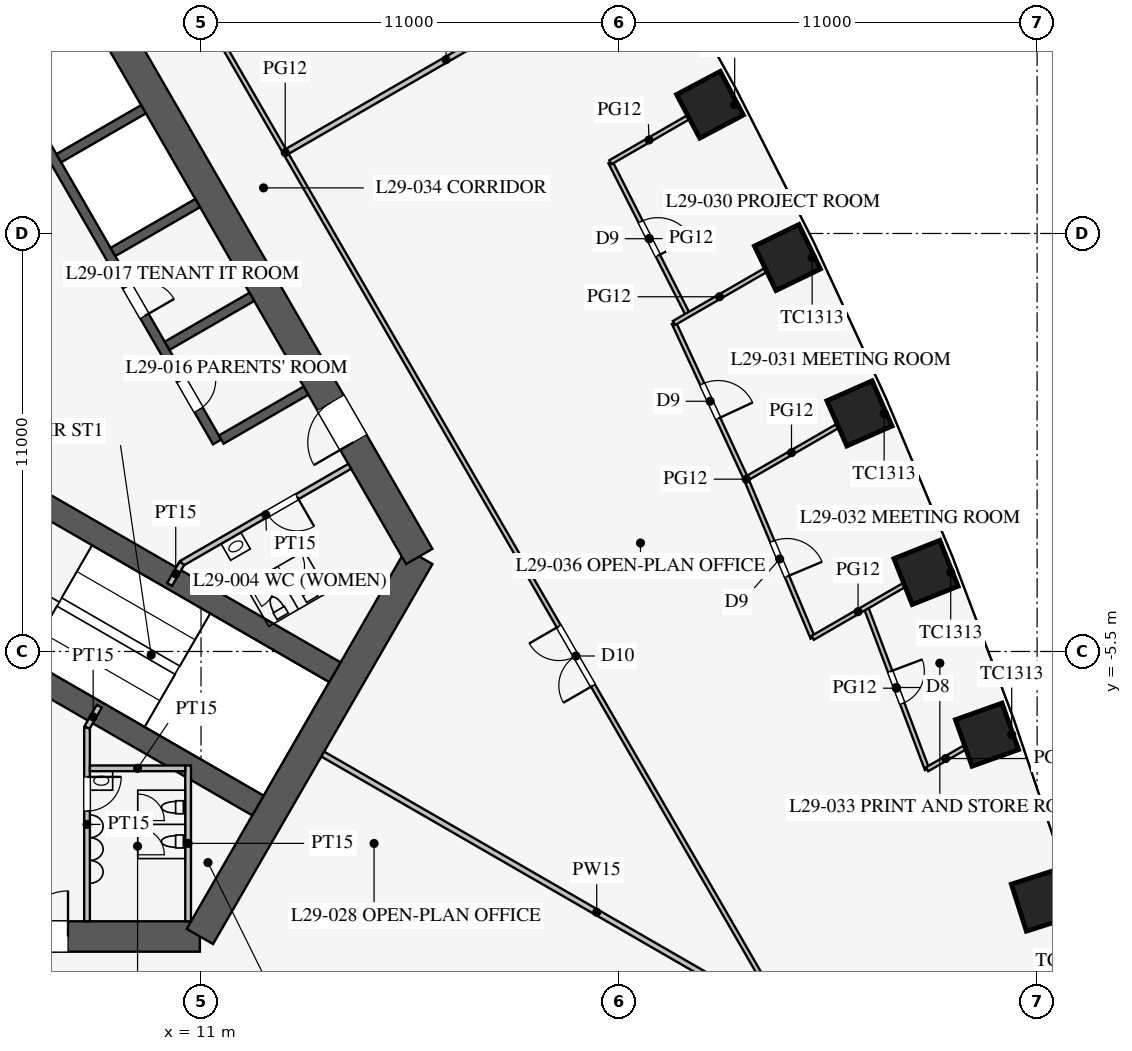
"""IFC4 building model, lengths in metres.
Left out: names, types, materials, properties, quantities, classifications, styles, units other than length and angle.
Written with IfcOpenShell. Run it as: python <this file> out.ifc"""

import sys

from ifc_helpers import new_model, si_unit, direction, frame, frame_2d, origin, origin_2d, place, context, subcontext, project, spatial, rectangle, extrude, element, fill, save


model = new_model("IFC4")
c1 = context("Model", 3, precision=1e-05, world=origin(), true_north=direction((0.0, 1.0)))
c2 = subcontext(c1, "Body", "Model", "MODEL_VIEW")
j1 = project(units=[si_unit("LENGTHUNIT", "METRE"), si_unit("PLANEANGLEUNIT", "RADIAN")], contexts=[c1])
p1 = place(None, origin())
s1 = spatial("IfcSite", under=j1, at=p1, CompositionType="ELEMENT")
p2 = place(p1, origin())
s2 = spatial("IfcBuilding", under=s1, at=p2, CompositionType="ELEMENT")
p3 = place(p2, frame((0.0, 0.0, 128.3)))
s3 = spatial("IfcBuildingStorey", under=s2, at=p3, CompositionType="ELEMENT", Elevation=128.3)
for number, where, z_axis, x_axis in (
    (1, (33.139, -12.044, 0.0), (0.0, 0.0, 1.0), (-0.305, 0.952, 0.0)),
    (2, (31.682, -7.689, 0.0), (0.0, 0.0, 1.0), (-0.336, 0.942, 0.0)),
    (3, (30.077, -3.42, 0.0), (0.0, 0.0, 1.0), (-0.37, 0.929, 0.0)),
    (4, (28.325, 0.765, 0.0), (0.0, 0.0, 1.0), (-0.403, 0.915, 0.0)),
    (5, (26.43, 4.867, 0.0), (0.0, 0.0, 1.0), (-0.436, 0.9, 0.0)),
    (6, (24.393, 8.887, 0.0), (0.0, 0.0, 1.0), (-0.468, 0.883, 0.0)),
):
    element("IfcColumn", number, at=place(p3, frame(where, z_axis=z_axis, x_axis=x_axis)), inside=s3, PredefinedType="COLUMN", context=c2, shape_type="SweptSolid", body=[
        extrude(rectangle(XDim=1.3, YDim=1.3, at=origin_2d()), origin(), (0.0, 0.0, 1.0), 4.2),
    ])
p4 = place(p3, frame((-10.97, -13.0, 0.0), z_axis=(0.0, 0.0, 1.0), x_axis=(1.0, 0.0, 0.0)))
e7 = element("IfcWall", 7, at=p4, inside=s3, PredefinedType="SHEAR", context=c2, shape_type="SweptSolid", body=[
    extrude(rectangle(XDim=21.939, YDim=0.8, at=frame_2d((10.97, 0.0))), origin(), (0.0, 0.0, 1.0), 4.2),
])
p5 = place(p4, frame((17.27, 0.0, 0.0)))
e8 = element("IfcOpeningElement", 8, at=p5, cuts=e7, PredefinedType="OPENING", context=c2, shape_type="SweptSolid", body=[
    extrude(rectangle(XDim=1.2, YDim=2.1, at=frame_2d((0.6, 1.05))), frame((0.0, 0.41, 0.0), z_axis=(0.0, -1.0, 0.0), x_axis=(1.0, 0.0, 0.0)), (0.0, 0.0, 1.0), 0.82),
])
p6 = place(p4, frame((3.47, 0.0, 0.0)))
e9 = element("IfcOpeningElement", 9, at=p6, cuts=e7, PredefinedType="OPENING", context=c2, shape_type="SweptSolid", body=[
    extrude(rectangle(XDim=1.2, YDim=2.1, at=frame_2d((0.6, 1.05))), frame((0.0, 0.41, 0.0), z_axis=(0.0, -1.0, 0.0), x_axis=(1.0, 0.0, 0.0)), (0.0, 0.0, 1.0), 0.82),
])
p7 = place(p3, frame((10.97, -13.0, 0.0), z_axis=(0.0, 0.0, 1.0), x_axis=(0.499995765644, 0.866027848477, 0.0)))
e10 = element("IfcWall", 10, at=p7, inside=s3, PredefinedType="SHEAR", context=c2, shape_type="SweptSolid", body=[
    extrude(rectangle(XDim=11.547, YDim=0.8, at=frame_2d((5.773, 0.0))), origin(), (0.0, 0.0, 1.0), 4.2),
])
p8 = place(p3, frame((16.743, -3.0, 0.0), z_axis=(0.0, 0.0, 1.0), x_axis=(-0.500002442456, 0.866023993627, 0.0)))
e11 = element("IfcWall", 11, at=p8, inside=s3, PredefinedType="SHEAR", context=c2, shape_type="SweptSolid", body=[
    extrude(rectangle(XDim=21.939, YDim=0.8, at=frame_2d((10.97, 0.0))), origin(), (0.0, 0.0, 1.0), 4.2),
])
p9 = place(p8, frame((17.27, 0.0, 0.0)))
e12 = element("IfcOpeningElement", 12, at=p9, cuts=e11, PredefinedType="OPENING", context=c2, shape_type="SweptSolid", body=[
    extrude(rectangle(XDim=1.2, YDim=2.1, at=frame_2d((0.6, 1.05))), frame((0.0, 0.41, 0.0), z_axis=(0.0, -1.0, 0.0), x_axis=(1.0, 0.0, 0.0)), (0.0, 0.0, 1.0), 0.82),
])
p10 = place(p8, frame((3.47, 0.0, 0.0)))
e13 = element("IfcOpeningElement", 13, at=p10, cuts=e11, PredefinedType="OPENING", context=c2, shape_type="SweptSolid", body=[
    extrude(rectangle(XDim=1.2, YDim=2.1, at=frame_2d((0.6, 1.05))), frame((0.0, 0.41, 0.0), z_axis=(0.0, -1.0, 0.0), x_axis=(1.0, 0.0, 0.0)), (0.0, 0.0, 1.0), 0.82),
])
p11 = place(p3, frame((11.424, 0.014, 0.0), z_axis=(0.0, 0.0, 1.0), x_axis=(-0.500001763848, 0.866024385424, 0.0)))
e14 = element("IfcWall", 14, at=p11, inside=s3, PredefinedType="SHEAR", context=c2, shape_type="SweptSolid", body=[
    extrude(rectangle(XDim=11.4, YDim=0.25, at=frame_2d((5.7, 0.0))), origin(), (0.0, 0.0, 1.0), 4.2),
])
p12 = place(p11, frame((0.975, 0.0, 0.0)))
e15 = element("IfcOpeningElement", 15, at=p12, cuts=e14, PredefinedType="OPENING", context=c2, shape_type="SweptSolid", body=[
    extrude(rectangle(XDim=0.9, YDim=2.1, at=frame_2d((0.45, 1.05))), frame((0.0, 0.135, 0.0), z_axis=(0.0, -1.0, 0.0), x_axis=(1.0, 0.0, 0.0)), (0.0, 0.0, 1.0), 0.27),
])
p13 = place(p11, frame((3.825, 0.0, 0.0)))
e16 = element("IfcOpeningElement", 16, at=p13, cuts=e14, PredefinedType="OPENING", context=c2, shape_type="SweptSolid", body=[
    extrude(rectangle(XDim=0.9, YDim=2.1, at=frame_2d((0.45, 1.05))), frame((0.0, 0.135, 0.0), z_axis=(0.0, -1.0, 0.0), x_axis=(1.0, 0.0, 0.0)), (0.0, 0.0, 1.0), 0.27),
])
for number, where, z_axis, x_axis in (
    (17, (11.532, 0.076, 0.0), (0.0, 0.0, 1.0), (0.866, 0.5, 0.0)),
    (18, (10.107, 2.544, 0.0), (0.0, 0.0, 1.0), (0.866, 0.5, 0.0)),
    (19, (8.682, 5.012, 0.0), (0.0, 0.0, 1.0), (0.866, 0.5, 0.0)),
    (20, (7.257, 7.481, 0.0), (0.0, 0.0, 1.0), (0.866, 0.5, 0.0)),
):
    element("IfcWall", number, at=place(p3, frame(where, z_axis=z_axis, x_axis=x_axis)), inside=s3, PredefinedType="SHEAR", context=c2, shape_type="SweptSolid", body=[
        extrude(rectangle(XDim=2.575, YDim=0.25, at=frame_2d((1.288, 0.0))), origin(), (0.0, 0.0, 1.0), 4.2),
    ])
p14 = place(p3, frame((5.832, 9.949, 0.0), z_axis=(0.0, 0.0, 1.0), x_axis=(0.866029291668, 0.499993265928, 0.0)))
e21 = element("IfcWall", 21, at=p14, inside=s3, PredefinedType="SHEAR", context=c2, shape_type="SweptSolid", body=[
    extrude(rectangle(XDim=2.575, YDim=0.25, at=frame_2d((1.288, 0.0))), origin(), (0.0, 0.0, 1.0), 4.2),
])
for number, where, z_axis, x_axis in (
    (22, (4.638, -5.016, 0.0), (0.0, 0.0, 1.0), (0.866, -0.5, 0.0)),
    (23, (6.663, -1.509, 0.0), (0.0, 0.0, 1.0), (0.866, -0.5, 0.0)),
):
    element("IfcWall", number, at=place(p3, frame(where, z_axis=z_axis, x_axis=x_axis)), inside=s3, PredefinedType="SHEAR", context=c2, shape_type="SweptSolid", body=[
        extrude(rectangle(XDim=9.075, YDim=0.6, at=frame_2d((4.538, 0.0))), origin(), (0.0, 0.0, 1.0), 4.2),
    ])
p15 = place(p3, frame((8.0, -7.5, 0.0), z_axis=(0.0, 0.0, 1.0), x_axis=(0.0, -1.0, 0.0)))
e24 = element("IfcWall", 24, at=p15, inside=s3, PredefinedType="PARTITIONING", context=c2, shape_type="SweptSolid", body=[
    extrude(rectangle(XDim=5.1, YDim=0.15, at=frame_2d((2.55, 0.0))), origin(), (0.0, 0.0, 1.0), 4.0),
])
p16 = place(p15, frame((1.3, 0.0, 0.0)))
e25 = element("IfcOpeningElement", 25, at=p16, cuts=e24, PredefinedType="OPENING", context=c2, shape_type="SweptSolid", body=[
    extrude(rectangle(XDim=0.9, YDim=2.1, at=frame_2d((0.45, 1.05))), frame((0.0, 0.085, 0.0), z_axis=(0.0, -1.0, 0.0), x_axis=(1.0, 0.0, 0.0)), (0.0, 0.0, 1.0), 0.17),
])
p17 = place(p3, frame((10.495, -3.178, 0.0), z_axis=(0.0, 0.0, 1.0), x_axis=(0.86602216432, 0.500005610874, 0.0)))
e26 = element("IfcWall", 26, at=p17, inside=s3, PredefinedType="PARTITIONING", context=c2, shape_type="SweptSolid", body=[
    extrude(rectangle(XDim=5.1, YDim=0.15, at=frame_2d((2.55, 0.0))), origin(), (0.0, 0.0, 1.0), 4.0),
])
p18 = place(p17, frame((2.6, 0.0, 0.0)))
e27 = element("IfcOpeningElement", 27, at=p18, cuts=e26, PredefinedType="OPENING", context=c2, shape_type="SweptSolid", body=[
    extrude(rectangle(XDim=0.9, YDim=2.1, at=frame_2d((0.45, 1.05))), frame((0.0, 0.085, 0.0), z_axis=(0.0, -1.0, 0.0), x_axis=(1.0, 0.0, 0.0)), (0.0, 0.0, 1.0), 0.17),
])
for number, where, z_axis, x_axis in (
    (28, (8.0, -7.5, 0.0), (0.0, 0.0, 1.0), (0.5, 0.866, 0.0)),
    (29, (10.495, -3.178, 0.0), (0.0, 0.0, 1.0), (-0.5, -0.866, 0.0)),
):
    element("IfcWall", number, at=place(p3, frame(where, z_axis=z_axis, x_axis=x_axis)), inside=s3, PredefinedType="PARTITIONING", context=c2, shape_type="SweptSolid", body=[
        extrude(rectangle(XDim=0.645, YDim=0.15, at=frame_2d((0.323, 0.0))), origin(), (0.0, 0.0, 1.0), 4.0),
    ])
p19 = place(p3, frame((10.66, -8.5, 0.0), z_axis=(0.0, 0.0, 1.0), x_axis=(0.0, -1.0, 0.0)))
e30 = element("IfcWall", 30, at=p19, inside=s3, PredefinedType="PARTITIONING", context=c2, shape_type="SweptSolid", body=[
    extrude(rectangle(XDim=4.1, YDim=0.15, at=frame_2d((2.05, 0.0))), origin(), (0.0, 0.0, 1.0), 4.0),
])
p20 = place(p3, frame((8.075, -8.575, 0.0), z_axis=(0.0, 0.0, 1.0), x_axis=(1.0, 0.0, 0.0)))
e31 = element("IfcWall", 31, at=p20, inside=s3, PredefinedType="PARTITIONING", context=c2, shape_type="SweptSolid", body=[
    extrude(rectangle(XDim=2.51, YDim=0.15, at=frame_2d((1.255, 0.0))), origin(), (0.0, 0.0, 1.0), 4.0),
])
p21 = place(p3, frame((14.203, -8.2, 0.0), z_axis=(0.0, 0.0, 1.0), x_axis=(0.866024668836, -0.500001272966, 0.0)))
e32 = element("IfcWall", 32, at=p21, inside=s3, PredefinedType="PARTITIONING", context=c2, shape_type="SweptSolid", body=[
    extrude(rectangle(XDim=16.65, YDim=0.15, at=frame_2d((8.325, 0.0))), origin(), (0.0, 0.0, 1.0), 2.3),
])
p22 = place(p3, frame((13.268, 7.66, 0.0), z_axis=(0.0, 0.0, 1.0), x_axis=(0.866015788683, 0.500016653474, 0.0)))
e33 = element("IfcWall", 33, at=p22, inside=s3, PredefinedType="PARTITIONING", context=c2, shape_type="SweptSolid", body=[
    extrude(rectangle(XDim=9.65, YDim=0.15, at=frame_2d((4.825, 0.0))), origin(), (0.0, 0.0, 1.0), 3.2),
])
p23 = place(p3, frame((26.415, -15.231, 0.0), z_axis=(0.0, 0.0, 1.0), x_axis=(-0.50000091641, 0.866024874695, 0.0)))
e34 = element("IfcWall", 34, at=p23, inside=s3, PredefinedType="PARTITIONING", context=c2, shape_type="SweptSolid", body=[
    extrude(rectangle(XDim=52.796, YDim=0.12, at=frame_2d((26.398, 0.0))), origin(), (0.0, 0.0, 1.0), 2.9),
])
p24 = place(p23, frame((10.2, 0.0, 0.15)))
e35 = element("IfcOpeningElement", 35, at=p24, cuts=e34, PredefinedType="OPENING", context=c2, shape_type="SweptSolid", body=[
    extrude(rectangle(XDim=1.8, YDim=2.1, at=frame_2d((0.9, 1.05))), frame((0.0, 0.07, 0.0), z_axis=(0.0, -1.0, 0.0), x_axis=(1.0, 0.0, 0.0)), (0.0, 0.0, 1.0), 0.14),
])
p25 = place(p23, frame((40.8, 0.0, 0.15)))
e36 = element("IfcOpeningElement", 36, at=p25, cuts=e34, PredefinedType="OPENING", context=c2, shape_type="SweptSolid", body=[
    extrude(rectangle(XDim=1.8, YDim=2.1, at=frame_2d((0.9, 1.05))), frame((0.0, 0.07, 0.0), z_axis=(0.0, -1.0, 0.0), x_axis=(1.0, 0.0, 0.0)), (0.0, 0.0, 1.0), 0.14),
])
p26 = place(p3, frame((25.342, -0.958, 0.0), z_axis=(0.0, 0.0, 1.0), x_axis=(-0.419883773418, 0.907577884713, 0.0)))
e37 = element("IfcWall", 37, at=p26, inside=s3, PredefinedType="PARTITIONING", context=c2, shape_type="SweptSolid", body=[
    extrude(rectangle(XDim=4.519, YDim=0.12, at=frame_2d((2.259, 0.0))), origin(), (0.0, 0.0, 1.0), 2.9),
])
p27 = place(p26, frame((1.75, 0.0, 0.15)))
e38 = element("IfcOpeningElement", 38, at=p27, cuts=e37, PredefinedType="OPENING", context=c2, shape_type="SweptSolid", body=[
    extrude(rectangle(XDim=1.0, YDim=2.1, at=frame_2d((0.5, 1.05))), frame((0.0, 0.07, 0.0), z_axis=(0.0, -1.0, 0.0), x_axis=(1.0, 0.0, 0.0)), (0.0, 0.0, 1.0), 0.14),
])
p28 = place(p3, frame((27.096, -5.141, 0.0), z_axis=(0.0, 0.0, 1.0), x_axis=(-0.386807881778, 0.922160323693, 0.0)))
e39 = element("IfcWall", 39, at=p28, inside=s3, PredefinedType="PARTITIONING", context=c2, shape_type="SweptSolid", body=[
    extrude(rectangle(XDim=4.536, YDim=0.12, at=frame_2d((2.268, 0.0))), origin(), (0.0, 0.0, 1.0), 2.9),
])
p29 = place(p28, frame((1.75, 0.0, 0.15)))
e40 = element("IfcOpeningElement", 40, at=p29, cuts=e39, PredefinedType="OPENING", context=c2, shape_type="SweptSolid", body=[
    extrude(rectangle(XDim=1.0, YDim=2.1, at=frame_2d((0.5, 1.05))), frame((0.0, 0.07, 0.0), z_axis=(0.0, -1.0, 0.0), x_axis=(1.0, 0.0, 0.0)), (0.0, 0.0, 1.0), 0.14),
])
p30 = place(p3, frame((30.104, -8.6, 0.0), z_axis=(0.0, 0.0, 1.0), x_axis=(-0.35295910498, 0.935638749845, 0.0)))
e41 = element("IfcWall", 41, at=p30, inside=s3, PredefinedType="PARTITIONING", context=c2, shape_type="SweptSolid", body=[
    extrude(rectangle(XDim=4.56, YDim=0.12, at=frame_2d((2.28, 0.0))), origin(), (0.0, 0.0, 1.0), 2.9),
])
p31 = place(p30, frame((1.85, 0.0, 0.15)))
e42 = element("IfcOpeningElement", 42, at=p31, cuts=e41, PredefinedType="OPENING", context=c2, shape_type="SweptSolid", body=[
    extrude(rectangle(XDim=0.9, YDim=2.1, at=frame_2d((0.45, 1.05))), frame((0.0, 0.07, 0.0), z_axis=(0.0, -1.0, 0.0), x_axis=(1.0, 0.0, 0.0)), (0.0, 0.0, 1.0), 0.14),
])
p32 = place(p3, frame((23.812, 3.356, 0.0), z_axis=(0.0, 0.0, 1.0), x_axis=(-0.452449820092, 0.891789863308, 0.0)))
e43 = element("IfcWall", 43, at=p32, inside=s3, PredefinedType="PARTITIONING", context=c2, shape_type="SweptSolid", body=[
    extrude(rectangle(XDim=4.507, YDim=0.12, at=frame_2d((2.253, 0.0))), origin(), (0.0, 0.0, 1.0), 2.9),
])
p33 = place(p32, frame((1.75, 0.0, 0.15)))
e44 = element("IfcOpeningElement", 44, at=p33, cuts=e43, PredefinedType="OPENING", context=c2, shape_type="SweptSolid", body=[
    extrude(rectangle(XDim=1.0, YDim=2.1, at=frame_2d((0.5, 1.05))), frame((0.0, 0.07, 0.0), z_axis=(0.0, -1.0, 0.0), x_axis=(1.0, 0.0, 0.0)), (0.0, 0.0, 1.0), 0.14),
])
p34 = place(p3, frame((25.342, -0.958, 0.0), z_axis=(0.0, 0.0, 1.0), x_axis=(0.866014808974, 0.500018350302, 0.0)))
e45 = element("IfcWall", 45, at=p34, inside=s3, PredefinedType="PARTITIONING", context=c2, shape_type="SweptSolid", body=[
    extrude(rectangle(XDim=2.762, YDim=0.12, at=frame_2d((1.381, 0.0))), origin(), (0.0, 0.0, 1.0), 2.9),
])
p35 = place(p3, frame((27.096, -5.141, 0.0), z_axis=(0.0, 0.0, 1.0), x_axis=(0.866014354455, 0.500019137511, 0.0)))
e46 = element("IfcWall", 46, at=p35, inside=s3, PredefinedType="PARTITIONING", context=c2, shape_type="SweptSolid", body=[
    extrude(rectangle(XDim=2.754, YDim=0.12, at=frame_2d((1.377, 0.0))), origin(), (0.0, 0.0, 1.0), 2.9),
])
p36 = place(p3, frame((30.104, -8.6, 0.0), z_axis=(0.0, 0.0, 1.0), x_axis=(0.866041729639, 0.499971721724, 0.0)))
e47 = element("IfcWall", 47, at=p36, inside=s3, PredefinedType="PARTITIONING", context=c2, shape_type="SweptSolid", body=[
    extrude(rectangle(XDim=1.13, YDim=0.12, at=frame_2d((0.565, 0.0))), origin(), (0.0, 0.0, 1.0), 2.9),
])
p37 = place(p3, frame((21.773, 7.375, 0.0), z_axis=(0.0, 0.0, 1.0), x_axis=(0.866055506462, 0.499947857008, 0.0)))
e48 = element("IfcWall", 48, at=p37, inside=s3, PredefinedType="PARTITIONING", context=c2, shape_type="SweptSolid", body=[
    extrude(rectangle(XDim=2.344, YDim=0.12, at=frame_2d((1.172, 0.0))), origin(), (0.0, 0.0, 1.0), 2.9),
])
p38 = place(p3, frame((23.444, 3.143, 0.0), z_axis=(0.0, 0.0, 1.0), x_axis=(0.866023907196, 0.500002592159, 0.0)))
e49 = element("IfcWall", 49, at=p38, inside=s3, PredefinedType="PARTITIONING", context=c2, shape_type="SweptSolid", body=[
    extrude(rectangle(XDim=2.766, YDim=0.12, at=frame_2d((1.383, 0.0))), origin(), (0.0, 0.0, 1.0), 2.9),
])
p39 = place(p16, origin())
e50 = element("IfcDoor", 50, at=p39, inside=s3, OperationType="SINGLE_SWING_LEFT", PredefinedType="DOOR", context=c2, shape_type="SweptSolid", body=[
    extrude(rectangle(XDim=0.9, YDim=2.1, at=frame_2d((0.45, 1.05))), frame((0.0, 0.025, 0.0), z_axis=(0.0, -1.0, 0.0), x_axis=(1.0, 0.0, 0.0)), (0.0, 0.0, 1.0), 0.05),
])
fill(e25, e50)
p40 = place(p18, frame((0.9, 0.0, 0.0), z_axis=(0.0, 0.0, 1.0), x_axis=(-1.0, 0.0, 0.0)))
e51 = element("IfcDoor", 51, at=p40, inside=s3, OperationType="SINGLE_SWING_LEFT", PredefinedType="DOOR", context=c2, shape_type="SweptSolid", body=[
    extrude(rectangle(XDim=0.9, YDim=2.1, at=frame_2d((0.45, 1.05))), frame((0.0, 0.025, 0.0), z_axis=(0.0, -1.0, 0.0), x_axis=(1.0, 0.0, 0.0)), (0.0, 0.0, 1.0), 0.05),
])
fill(e27, e51)
p41 = place(p5, origin())
e52 = element("IfcDoor", 52, at=p41, inside=s3, OperationType="SINGLE_SWING_RIGHT", PredefinedType="DOOR", context=c2, shape_type="SweptSolid", body=[
    extrude(rectangle(XDim=1.2, YDim=2.1, at=frame_2d((0.6, 1.05))), frame((0.0, 0.025, 0.0), z_axis=(0.0, -1.0, 0.0), x_axis=(1.0, 0.0, 0.0)), (0.0, 0.0, 1.0), 0.05),
])
fill(e8, e52)
p42 = place(p10, origin())
e53 = element("IfcDoor", 53, at=p42, inside=s3, OperationType="SINGLE_SWING_LEFT", PredefinedType="DOOR", context=c2, shape_type="SweptSolid", body=[
    extrude(rectangle(XDim=1.2, YDim=2.1, at=frame_2d((0.6, 1.05))), frame((0.0, 0.025, 0.0), z_axis=(0.0, -1.0, 0.0), x_axis=(1.0, 0.0, 0.0)), (0.0, 0.0, 1.0), 0.05),
])
fill(e13, e53)
p43 = place(p12, frame((0.9, 0.0, 0.0), z_axis=(0.0, 0.0, 1.0), x_axis=(-1.0, 0.0, 0.0)))
e54 = element("IfcDoor", 54, at=p43, inside=s3, OperationType="SINGLE_SWING_LEFT", PredefinedType="DOOR", context=c2, shape_type="SweptSolid", body=[
    extrude(rectangle(XDim=0.9, YDim=2.1, at=frame_2d((0.45, 1.05))), frame((0.0, 0.025, 0.0), z_axis=(0.0, -1.0, 0.0), x_axis=(1.0, 0.0, 0.0)), (0.0, 0.0, 1.0), 0.05),
])
fill(e15, e54)
p44 = place(p13, frame((0.9, 0.0, 0.0), z_axis=(0.0, 0.0, 1.0), x_axis=(-1.0, 0.0, 0.0)))
e55 = element("IfcDoor", 55, at=p44, inside=s3, OperationType="SINGLE_SWING_RIGHT", PredefinedType="DOOR", context=c2, shape_type="SweptSolid", body=[
    extrude(rectangle(XDim=0.9, YDim=2.1, at=frame_2d((0.45, 1.05))), frame((0.0, 0.025, 0.0), z_axis=(0.0, -1.0, 0.0), x_axis=(1.0, 0.0, 0.0)), (0.0, 0.0, 1.0), 0.05),
])
fill(e16, e55)
p45 = place(p33, frame((1.0, 0.0, 0.0), z_axis=(0.0, 0.0, 1.0), x_axis=(-1.0, 0.0, 0.0)))
e56 = element("IfcDoor", 56, at=p45, inside=s3, OperationType="SINGLE_SWING_RIGHT", PredefinedType="DOOR", context=c2, shape_type="SweptSolid", body=[
    extrude(rectangle(XDim=1.0, YDim=2.1, at=frame_2d((0.5, 1.05))), frame((0.0, 0.025, 0.0), z_axis=(0.0, -1.0, 0.0), x_axis=(1.0, 0.0, 0.0)), (0.0, 0.0, 1.0), 0.05),
])
fill(e44, e56)
p46 = place(p27, frame((1.0, 0.0, 0.0), z_axis=(0.0, 0.0, 1.0), x_axis=(-1.0, 0.0, 0.0)))
e57 = element("IfcDoor", 57, at=p46, inside=s3, OperationType="SINGLE_SWING_RIGHT", PredefinedType="DOOR", context=c2, shape_type="SweptSolid", body=[
    extrude(rectangle(XDim=1.0, YDim=2.1, at=frame_2d((0.5, 1.05))), frame((0.0, 0.025, 0.0), z_axis=(0.0, -1.0, 0.0), x_axis=(1.0, 0.0, 0.0)), (0.0, 0.0, 1.0), 0.05),
])
fill(e38, e57)
p47 = place(p29, frame((1.0, 0.0, 0.0), z_axis=(0.0, 0.0, 1.0), x_axis=(-1.0, 0.0, 0.0)))
e58 = element("IfcDoor", 58, at=p47, inside=s3, OperationType="SINGLE_SWING_RIGHT", PredefinedType="DOOR", context=c2, shape_type="SweptSolid", body=[
    extrude(rectangle(XDim=1.0, YDim=2.1, at=frame_2d((0.5, 1.05))), frame((0.0, 0.025, 0.0), z_axis=(0.0, -1.0, 0.0), x_axis=(1.0, 0.0, 0.0)), (0.0, 0.0, 1.0), 0.05),
])
fill(e40, e58)
p48 = place(p31, frame((0.9, 0.0, 0.0), z_axis=(0.0, 0.0, 1.0), x_axis=(-1.0, 0.0, 0.0)))
e59 = element("IfcDoor", 59, at=p48, inside=s3, OperationType="SINGLE_SWING_LEFT", PredefinedType="DOOR", context=c2, shape_type="SweptSolid", body=[
    extrude(rectangle(XDim=0.9, YDim=2.1, at=frame_2d((0.45, 1.05))), frame((0.0, 0.025, 0.0), z_axis=(0.0, -1.0, 0.0), x_axis=(1.0, 0.0, 0.0)), (0.0, 0.0, 1.0), 0.05),
])
fill(e42, e59)
p49 = place(p24, origin())
e60 = element("IfcDoor", 60, at=p49, inside=s3, OperationType="DOUBLE_DOOR_SINGLE_SWING", PredefinedType="DOOR", context=c2, shape_type="SweptSolid", body=[
    extrude(rectangle(XDim=1.8, YDim=2.1, at=frame_2d((0.9, 1.05))), frame((0.0, 0.025, 0.0), z_axis=(0.0, -1.0, 0.0), x_axis=(1.0, 0.0, 0.0)), (0.0, 0.0, 1.0), 0.05),
])
fill(e35, e60)
save(model, sys.argv[1])
